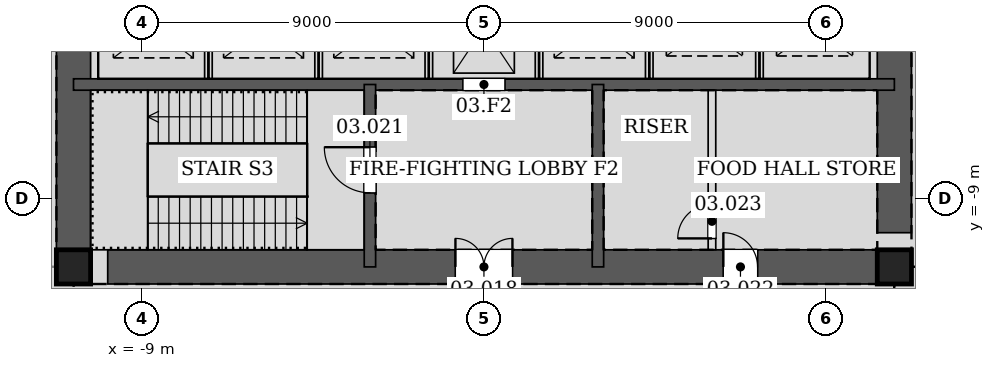
"""IFC4 building model, lengths in metres.
Left out: names, types, materials, properties, quantities, classifications, styles, units other than length and angle.
Written with IfcOpenShell. Run it as: python <this file> out.ifc"""

import sys

from ifc_helpers import new_model, si_unit, direction, frame, frame_2d, origin, origin_2d, place, context, subcontext, project, spatial, rectangle, hollow_rectangle, extrude, element, fill, save


model = new_model("IFC4")
c1 = context("Model", 3, precision=1e-05, world=origin(), true_north=direction((0.0, 1.0)))
c2 = subcontext(c1, "Body", "Model", "MODEL_VIEW")
j1 = project(units=[si_unit("LENGTHUNIT", "METRE"), si_unit("PLANEANGLEUNIT", "RADIAN")], contexts=[c1])
p1 = place(None, origin())
s1 = spatial("IfcSite", under=j1, at=p1, CompositionType="ELEMENT")
p2 = place(p1, origin())
s2 = spatial("IfcBuilding", under=s1, at=p2, CompositionType="ELEMENT")
p3 = place(p2, frame((0.0, 0.0, 18.6)))
s3 = spatial("IfcBuildingStorey", under=s2, at=p3, CompositionType="ELEMENT", Elevation=18.6)
for number, where, z_axis, x_axis in (
    (1, (-10.8, -10.8, 0.0), (0.0, 0.0, 1.0), (1.0, 0.0, 0.0)),
    (2, (10.8, -10.8, 0.0), (0.0, 0.0, 1.0), (1.0, 0.0, 0.0)),
):
    element("IfcColumn", number, at=place(p3, frame(where, z_axis=z_axis, x_axis=x_axis)), inside=s3, PredefinedType="COLUMN", context=c2, shape_type="SweptSolid", body=[
        extrude(hollow_rectangle(XDim=0.9, YDim=0.9, WallThickness=0.06, at=origin_2d()), origin(), (0.0, 0.0, 1.0), 5.4),
    ])
p4 = place(p3, frame((-10.8, -10.8, 0.0), z_axis=(0.0, 0.0, 1.0), x_axis=(1.0, 0.0, 0.0)))
e3 = element("IfcWall", 3, at=p4, inside=s3, PredefinedType="SOLIDWALL", context=c2, shape_type="SweptSolid", body=[
    extrude(rectangle(XDim=21.6, YDim=0.9, at=frame_2d((10.8, 0.0))), origin(), (0.0, 0.0, 1.0), 5.4),
])
p5 = place(p4, frame((10.05, 0.0, 0.0)))
e4 = element("IfcOpeningElement", 4, at=p5, cuts=e3, PredefinedType="OPENING", context=c2, shape_type="SweptSolid", body=[
    extrude(rectangle(XDim=1.5, YDim=2.1, at=frame_2d((0.75, 1.05))), frame((0.0, 0.46, 0.0), z_axis=(0.0, -1.0, 0.0), x_axis=(1.0, 0.0, 0.0)), (0.0, 0.0, 1.0), 0.92),
])
p6 = place(p4, frame((17.1, 0.0, 0.0)))
e5 = element("IfcOpeningElement", 5, at=p6, cuts=e3, PredefinedType="OPENING", context=c2, shape_type="SweptSolid", body=[
    extrude(rectangle(XDim=0.9, YDim=2.1, at=frame_2d((0.45, 1.05))), frame((0.0, 0.46, 0.0), z_axis=(0.0, -1.0, 0.0), x_axis=(1.0, 0.0, 0.0)), (0.0, 0.0, 1.0), 0.92),
])
p7 = place(p3, frame((10.8, -10.8, 0.0), z_axis=(0.0, 0.0, 1.0), x_axis=(0.0, 1.0, 0.0)))
e6 = element("IfcWall", 6, at=p7, inside=s3, PredefinedType="SOLIDWALL", context=c2, shape_type="SweptSolid", body=[
    extrude(rectangle(XDim=21.6, YDim=0.9, at=frame_2d((10.8, 0.0))), origin(), (0.0, 0.0, 1.0), 5.4),
])
p8 = place(p7, frame((11.7, 0.0, 0.0)))
e7 = element("IfcOpeningElement", 7, at=p8, cuts=e6, PredefinedType="OPENING", context=c2, shape_type="SweptSolid", body=[
    extrude(rectangle(XDim=1.2, YDim=2.1, at=frame_2d((0.6, 1.05))), frame((0.0, 0.46, 0.0), z_axis=(0.0, -1.0, 0.0), x_axis=(1.0, 0.0, 0.0)), (0.0, 0.0, 1.0), 0.92),
])
p9 = place(p7, frame((8.7, 0.0, 0.0)))
e8 = element("IfcOpeningElement", 8, at=p9, cuts=e6, PredefinedType="OPENING", context=c2, shape_type="SweptSolid", body=[
    extrude(rectangle(XDim=1.2, YDim=2.1, at=frame_2d((0.6, 1.05))), frame((0.0, 0.46, 0.0), z_axis=(0.0, -1.0, 0.0), x_axis=(1.0, 0.0, 0.0)), (0.0, 0.0, 1.0), 0.92),
])
p10 = place(p3, frame((-10.8, 10.8, 0.0), z_axis=(0.0, 0.0, 1.0), x_axis=(0.0, -1.0, 0.0)))
e9 = element("IfcWall", 9, at=p10, inside=s3, PredefinedType="SOLIDWALL", context=c2, shape_type="SweptSolid", body=[
    extrude(rectangle(XDim=21.6, YDim=0.9, at=frame_2d((10.8, 0.0))), origin(), (0.0, 0.0, 1.0), 5.4),
])
p11 = place(p10, frame((8.7, 0.0, 0.0)))
e10 = element("IfcOpeningElement", 10, at=p11, cuts=e9, PredefinedType="OPENING", context=c2, shape_type="SweptSolid", body=[
    extrude(rectangle(XDim=1.2, YDim=2.1, at=frame_2d((0.6, 1.05))), frame((0.0, 0.46, 0.0), z_axis=(0.0, -1.0, 0.0), x_axis=(1.0, 0.0, 0.0)), (0.0, 0.0, 1.0), 0.92),
])
p12 = place(p10, frame((11.7, 0.0, 0.0)))
e11 = element("IfcOpeningElement", 11, at=p12, cuts=e9, PredefinedType="OPENING", context=c2, shape_type="SweptSolid", body=[
    extrude(rectangle(XDim=1.2, YDim=2.1, at=frame_2d((0.6, 1.05))), frame((0.0, 0.46, 0.0), z_axis=(0.0, -1.0, 0.0), x_axis=(1.0, 0.0, 0.0)), (0.0, 0.0, 1.0), 0.92),
])
p13 = place(p3, frame((-10.8, -6.0, 0.0), z_axis=(0.0, 0.0, 1.0), x_axis=(1.0, 0.0, 0.0)))
e12 = element("IfcWall", 12, at=p13, inside=s3, PredefinedType="SOLIDWALL", context=c2, shape_type="SweptSolid", body=[
    extrude(rectangle(XDim=21.6, YDim=0.3, at=frame_2d((10.8, 0.0))), origin(), (0.0, 0.0, 1.0), 5.4),
])
p14 = place(p13, frame((10.25, 0.0, 0.0)))
e13 = element("IfcOpeningElement", 13, at=p14, cuts=e12, PredefinedType="OPENING", context=c2, shape_type="SweptSolid", body=[
    extrude(rectangle(XDim=1.1, YDim=2.1, at=frame_2d((0.55, 1.05))), frame((0.0, 0.16, 0.0), z_axis=(0.0, -1.0, 0.0), x_axis=(1.0, 0.0, 0.0)), (0.0, 0.0, 1.0), 0.32),
])
p15 = place(p3, frame((-3.0, -6.0, 0.0), z_axis=(0.0, 0.0, 1.0), x_axis=(0.0, -1.0, 0.0)))
e14 = element("IfcWall", 14, at=p15, inside=s3, PredefinedType="SOLIDWALL", context=c2, shape_type="SweptSolid", body=[
    extrude(rectangle(XDim=4.8, YDim=0.3, at=frame_2d((2.4, 0.0))), origin(), (0.0, 0.0, 1.0), 5.4),
])
p16 = place(p15, frame((1.65, 0.0, 0.0)))
e15 = element("IfcOpeningElement", 15, at=p16, cuts=e14, PredefinedType="OPENING", context=c2, shape_type="SweptSolid", body=[
    extrude(rectangle(XDim=1.2, YDim=2.1, at=frame_2d((0.6, 1.05))), frame((0.0, 0.16, 0.0), z_axis=(0.0, -1.0, 0.0), x_axis=(1.0, 0.0, 0.0)), (0.0, 0.0, 1.0), 0.32),
])
p17 = place(p3, frame((3.0, -6.0, 0.0), z_axis=(0.0, 0.0, 1.0), x_axis=(0.0, -1.0, 0.0)))
e16 = element("IfcWall", 16, at=p17, inside=s3, PredefinedType="SOLIDWALL", context=c2, shape_type="SweptSolid", body=[
    extrude(rectangle(XDim=4.8, YDim=0.3, at=frame_2d((2.4, 0.0))), origin(), (0.0, 0.0, 1.0), 5.4),
])
for number, where, z_axis, x_axis in (
    (17, (-7.25, -5.85, 0.0), (0.0, 0.0, 1.0), (0.0, 1.0, 0.0)),
    (18, (-4.35, -5.85, 0.0), (0.0, 0.0, 1.0), (0.0, 1.0, 0.0)),
    (19, (-1.45, -5.85, 0.0), (0.0, 0.0, 1.0), (0.0, 1.0, 0.0)),
    (20, (1.45, -5.85, 0.0), (0.0, 0.0, 1.0), (0.0, 1.0, 0.0)),
    (21, (4.35, -5.85, 0.0), (0.0, 0.0, 1.0), (0.0, 1.0, 0.0)),
    (22, (7.25, -5.85, 0.0), (0.0, 0.0, 1.0), (0.0, 1.0, 0.0)),
):
    element("IfcWall", number, at=place(p3, frame(where, z_axis=z_axis, x_axis=x_axis)), inside=s3, PredefinedType="PARTITIONING", context=c2, shape_type="SweptSolid", body=[
        extrude(rectangle(XDim=2.7, YDim=0.2, at=frame_2d((1.35, 0.0))), origin(), (0.0, 0.0, 1.0), 5.4),
    ])
p18 = place(p3, frame((6.0, -10.35, 0.0), z_axis=(0.0, 0.0, 1.0), x_axis=(0.0, 1.0, 0.0)))
e23 = element("IfcWall", 23, at=p18, inside=s3, PredefinedType="PARTITIONING", context=c2, shape_type="SweptSolid", body=[
    extrude(rectangle(XDim=4.2, YDim=0.2, at=frame_2d((2.1, 0.0))), origin(), (0.0, 0.0, 1.0), 5.1),
])
p19 = place(p18, frame((0.3, 0.0, 0.0)))
e24 = element("IfcOpeningElement", 24, at=p19, cuts=e23, PredefinedType="OPENING", context=c2, shape_type="SweptSolid", body=[
    extrude(rectangle(XDim=0.9, YDim=2.1, at=frame_2d((0.45, 1.05))), frame((0.0, 0.11, 0.0), z_axis=(0.0, -1.0, 0.0), x_axis=(1.0, 0.0, 0.0)), (0.0, 0.0, 1.0), 0.22),
])
p20 = place(p5, origin())
e25 = element("IfcDoor", 25, at=p20, inside=s3, OperationType="DOUBLE_DOOR_SINGLE_SWING", PredefinedType="DOOR", context=c2, shape_type="SweptSolid", body=[
    extrude(rectangle(XDim=1.5, YDim=2.1, at=frame_2d((0.75, 1.05))), frame((0.0, 0.025, 0.0), z_axis=(0.0, -1.0, 0.0), x_axis=(1.0, 0.0, 0.0)), (0.0, 0.0, 1.0), 0.05),
])
fill(e4, e25)
p21 = place(p16, frame((1.2, 0.0, 0.0), z_axis=(0.0, 0.0, 1.0), x_axis=(-1.0, 0.0, 0.0)))
e26 = element("IfcDoor", 26, at=p21, inside=s3, OperationType="SINGLE_SWING_RIGHT", PredefinedType="DOOR", context=c2, shape_type="SweptSolid", body=[
    extrude(rectangle(XDim=1.2, YDim=2.1, at=frame_2d((0.6, 1.05))), frame((0.0, 0.025, 0.0), z_axis=(0.0, -1.0, 0.0), x_axis=(1.0, 0.0, 0.0)), (0.0, 0.0, 1.0), 0.05),
])
fill(e15, e26)
p22 = place(p6, origin())
e27 = element("IfcDoor", 27, at=p22, inside=s3, OperationType="SINGLE_SWING_LEFT", PredefinedType="DOOR", context=c2, shape_type="SweptSolid", body=[
    extrude(rectangle(XDim=0.9, YDim=2.1, at=frame_2d((0.45, 1.05))), frame((0.0, 0.025, 0.0), z_axis=(0.0, -1.0, 0.0), x_axis=(1.0, 0.0, 0.0)), (0.0, 0.0, 1.0), 0.05),
])
fill(e5, e27)
p23 = place(p19, origin())
e28 = element("IfcDoor", 28, at=p23, inside=s3, OperationType="SINGLE_SWING_LEFT", PredefinedType="DOOR", context=c2, shape_type="SweptSolid", body=[
    extrude(rectangle(XDim=0.9, YDim=2.1, at=frame_2d((0.45, 1.05))), frame((0.0, 0.025, 0.0), z_axis=(0.0, -1.0, 0.0), x_axis=(1.0, 0.0, 0.0)), (0.0, 0.0, 1.0), 0.05),
])
fill(e24, e28)
p24 = place(p14, origin())
e29 = element("IfcDoor", 29, at=p24, inside=s3, OperationType="DOUBLE_DOOR_SLIDING", PredefinedType="DOOR", context=c2, shape_type="SweptSolid", body=[
    extrude(rectangle(XDim=1.1, YDim=2.1, at=frame_2d((0.55, 1.05))), frame((0.0, 0.025, 0.0), z_axis=(0.0, -1.0, 0.0), x_axis=(1.0, 0.0, 0.0)), (0.0, 0.0, 1.0), 0.05),
])
fill(e13, e29)
save(model, sys.argv[1])
